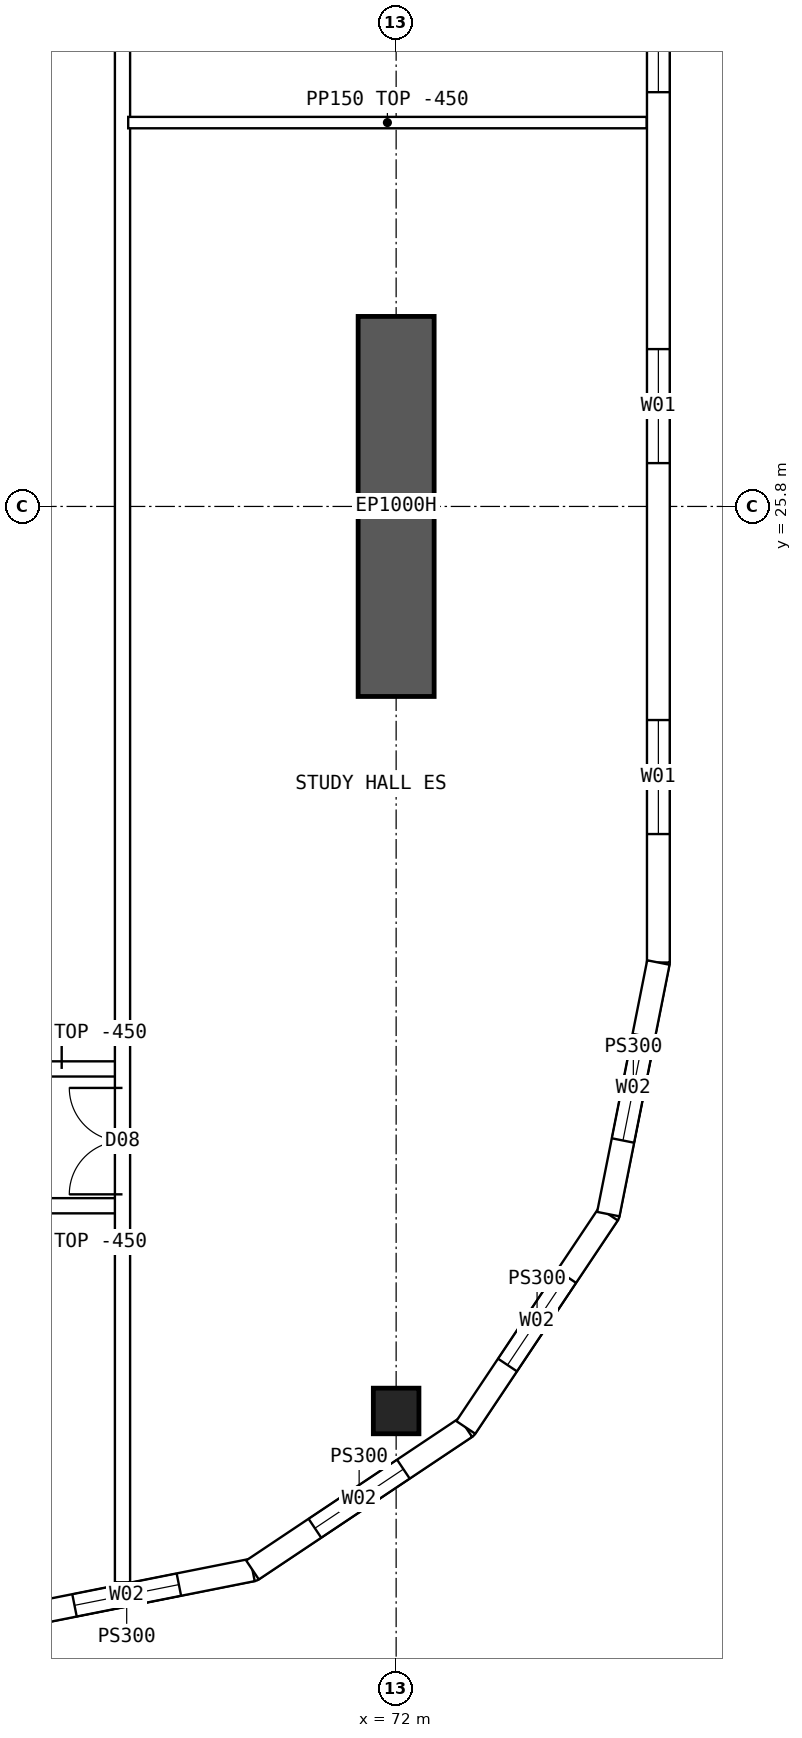
"""IFC4 building model, lengths in metres.
Left out: names, types, materials, properties, quantities, classifications, styles, units other than length and angle.
Written with IfcOpenShell. Run it as: python <this file> out.ifc"""

import sys

from ifc_helpers import new_model, si_unit, direction, frame, frame_2d, origin, origin_2d, place, context, subcontext, project, spatial, polyline, rectangle, hollow_rectangle, outline, extrude, element, fill, save


model = new_model("IFC4")
c1 = context("Model", 3, precision=1e-05, world=origin(), true_north=direction((0.0, 1.0)))
c2 = subcontext(c1, "Body", "Model", "MODEL_VIEW")
j1 = project(units=[si_unit("LENGTHUNIT", "METRE"), si_unit("PLANEANGLEUNIT", "RADIAN")], contexts=[c1])
p1 = place(None, origin())
s1 = spatial("IfcSite", under=j1, at=p1, CompositionType="ELEMENT")
p2 = place(p1, origin())
s2 = spatial("IfcBuilding", under=s1, at=p2, CompositionType="ELEMENT")
p3 = place(p2, frame((0.0, 0.0, 242.8)))
s3 = spatial("IfcBuildingStorey", under=s2, at=p3, CompositionType="ELEMENT", Elevation=242.8)
p4 = place(p3, frame((72.0, 13.9, 0.0), z_axis=(0.0, 0.0, 1.0), x_axis=(1.0, 0.0, 0.0)))
e1 = element("IfcColumn", 1, at=p4, inside=s3, PredefinedType="COLUMN", context=c2, shape_type="SweptSolid", body=[
    extrude(hollow_rectangle(XDim=0.6, YDim=0.6, WallThickness=0.06, at=origin_2d()), origin(), (0.0, 0.0, 1.0), 3.75),
])
p5 = place(p3, frame((72.0, 23.3, 0.0), z_axis=(0.0, 0.0, 1.0), x_axis=(0.0, 1.0, 0.0)))
e2 = element("IfcWall", 2, at=p5, inside=s3, PredefinedType="SHEAR", context=c2, shape_type="SweptSolid", body=[
    extrude(rectangle(XDim=5.0, YDim=1.0, at=frame_2d((2.5, 0.0))), origin(), (0.0, 0.0, 1.0), 3.75),
])
p6 = place(p3, frame((75.45, 19.8, 0.0), z_axis=(0.0, 0.0, 1.0), x_axis=(0.0, 1.0, 0.0)))
e3 = element("IfcWall", 3, at=p6, inside=s3, PredefinedType="SOLIDWALL", context=c2, shape_type="SweptSolid", body=[
    extrude(outline(polyline([(-0.015, -0.15), (24.415, -0.15), (24.385, 0.15), (0.015, 0.15), (-0.015, -0.15)])), origin(), (0.0, 0.0, 1.0), 3.3),
])
p7 = place(p6, frame((1.69, 0.0, 0.9)))
e4 = element("IfcOpeningElement", 4, at=p7, cuts=e3, PredefinedType="OPENING", context=c2, shape_type="SweptSolid", body=[
    extrude(rectangle(XDim=1.5, YDim=2.0, at=frame_2d((0.75, 1.0))), frame((0.0, 0.16, 0.0), z_axis=(0.0, -1.0, 0.0), x_axis=(1.0, 0.0, 0.0)), (0.0, 0.0, 1.0), 0.32),
])
p8 = place(p6, frame((6.57, 0.0, 0.9)))
e5 = element("IfcOpeningElement", 5, at=p8, cuts=e3, PredefinedType="OPENING", context=c2, shape_type="SweptSolid", body=[
    extrude(rectangle(XDim=1.5, YDim=2.0, at=frame_2d((0.75, 1.0))), frame((0.0, 0.16, 0.0), z_axis=(0.0, -1.0, 0.0), x_axis=(1.0, 0.0, 0.0)), (0.0, 0.0, 1.0), 0.32),
])
p9 = place(p6, frame((11.45, 0.0, 0.9)))
e6 = element("IfcOpeningElement", 6, at=p9, cuts=e3, PredefinedType="OPENING", context=c2, shape_type="SweptSolid", body=[
    extrude(rectangle(XDim=1.5, YDim=2.0, at=frame_2d((0.75, 1.0))), frame((0.0, 0.16, 0.0), z_axis=(0.0, -1.0, 0.0), x_axis=(1.0, 0.0, 0.0)), (0.0, 0.0, 1.0), 0.32),
])
p10 = place(p6, frame((16.33, 0.0, 0.9)))
e7 = element("IfcOpeningElement", 7, at=p10, cuts=e3, PredefinedType="OPENING", context=c2, shape_type="SweptSolid", body=[
    extrude(rectangle(XDim=1.5, YDim=2.0, at=frame_2d((0.75, 1.0))), frame((0.0, 0.16, 0.0), z_axis=(0.0, -1.0, 0.0), x_axis=(1.0, 0.0, 0.0)), (0.0, 0.0, 1.0), 0.32),
])
p11 = place(p6, frame((21.21, 0.0, 0.9)))
e8 = element("IfcOpeningElement", 8, at=p11, cuts=e3, PredefinedType="OPENING", context=c2, shape_type="SweptSolid", body=[
    extrude(rectangle(XDim=1.5, YDim=2.0, at=frame_2d((0.75, 1.0))), frame((0.0, 0.16, 0.0), z_axis=(0.0, -1.0, 0.0), x_axis=(1.0, 0.0, 0.0)), (0.0, 0.0, 1.0), 0.32),
])
p12 = place(p3, frame((66.8, 11.15, 0.0), z_axis=(0.0, 0.0, 1.0), x_axis=(0.98078325777, 0.195100490205, 0.0)))
e9 = element("IfcWall", 9, at=p12, inside=s3, PredefinedType="SOLIDWALL", context=c2, shape_type="SweptSolid", body=[
    extrude(outline(polyline([(-0.03, -0.15), (3.405, -0.15), (3.345, 0.15), (0.03, 0.15), (-0.03, -0.15)])), origin(), (0.0, 0.0, 1.0), 3.3),
])
p13 = place(p12, frame((0.988, 0.0, 0.9)))
e10 = element("IfcOpeningElement", 10, at=p13, cuts=e9, PredefinedType="OPENING", context=c2, shape_type="SweptSolid", body=[
    extrude(rectangle(XDim=1.4, YDim=1.8, at=frame_2d((0.7, 0.9))), frame((0.0, 0.16, 0.0), z_axis=(0.0, -1.0, 0.0), x_axis=(1.0, 0.0, 0.0)), (0.0, 0.0, 1.0), 0.32),
])
p14 = place(p3, frame((70.11, 11.808, 0.0), z_axis=(0.0, 0.0, 1.0), x_axis=(0.831460037396, 0.555584562613, 0.0)))
e11 = element("IfcWall", 11, at=p14, inside=s3, PredefinedType="SOLIDWALL", context=c2, shape_type="SweptSolid", body=[
    extrude(outline(polyline([(-0.03, -0.15), (3.405, -0.15), (3.345, 0.15), (0.03, 0.15), (-0.03, -0.15)])), origin(), (0.0, 0.0, 1.0), 3.3),
])
p15 = place(p14, frame((0.988, 0.0, 0.9)))
e12 = element("IfcOpeningElement", 12, at=p15, cuts=e11, PredefinedType="OPENING", context=c2, shape_type="SweptSolid", body=[
    extrude(rectangle(XDim=1.4, YDim=1.8, at=frame_2d((0.7, 0.9))), frame((0.0, 0.16, 0.0), z_axis=(0.0, -1.0, 0.0), x_axis=(1.0, 0.0, 0.0)), (0.0, 0.0, 1.0), 0.32),
])
p16 = place(p3, frame((72.917, 13.684, 0.0), z_axis=(0.0, 0.0, 1.0), x_axis=(0.555567969291, 0.831471124873, 0.0)))
e13 = element("IfcWall", 13, at=p16, inside=s3, PredefinedType="SOLIDWALL", context=c2, shape_type="SweptSolid", body=[
    extrude(outline(polyline([(-0.03, -0.15), (3.405, -0.15), (3.345, 0.15), (0.03, 0.15), (-0.03, -0.15)])), origin(), (0.0, 0.0, 1.0), 3.3),
])
p17 = place(p16, frame((0.988, 0.0, 0.9)))
e14 = element("IfcOpeningElement", 14, at=p17, cuts=e13, PredefinedType="OPENING", context=c2, shape_type="SweptSolid", body=[
    extrude(rectangle(XDim=1.4, YDim=1.8, at=frame_2d((0.7, 0.9))), frame((0.0, 0.16, 0.0), z_axis=(0.0, -1.0, 0.0), x_axis=(1.0, 0.0, 0.0)), (0.0, 0.0, 1.0), 0.32),
])
p18 = place(p3, frame((74.792, 16.49, 0.0), z_axis=(0.0, 0.0, 1.0), x_axis=(0.19508664885, 0.980786011034, 0.0)))
e15 = element("IfcWall", 15, at=p18, inside=s3, PredefinedType="SOLIDWALL", context=c2, shape_type="SweptSolid", body=[
    extrude(outline(polyline([(-0.03, -0.15), (3.39, -0.15), (3.36, 0.15), (0.03, 0.15), (-0.03, -0.15)])), origin(), (0.0, 0.0, 1.0), 3.3),
])
p19 = place(p18, frame((0.988, 0.0, 0.9)))
e16 = element("IfcOpeningElement", 16, at=p19, cuts=e15, PredefinedType="OPENING", context=c2, shape_type="SweptSolid", body=[
    extrude(rectangle(XDim=1.4, YDim=1.8, at=frame_2d((0.7, 0.9))), frame((0.0, 0.16, 0.0), z_axis=(0.0, -1.0, 0.0), x_axis=(1.0, 0.0, 0.0)), (0.0, 0.0, 1.0), 0.32),
])
p20 = place(p3, frame((66.35, 16.6, 0.0), z_axis=(0.0, 0.0, 1.0), x_axis=(1.0, 0.0, 0.0)))
e17 = element("IfcWall", 17, at=p20, inside=s3, PredefinedType="SOLIDWALL", context=c2, shape_type="SweptSolid", body=[
    extrude(rectangle(XDim=2.05, YDim=0.2, at=frame_2d((1.025, 0.0))), origin(), (0.0, 0.0, 1.0), 3.3),
])
p21 = place(p20, frame((0.2, 0.0, 0.0)))
e18 = element("IfcOpeningElement", 18, at=p21, cuts=e17, PredefinedType="OPENING", context=c2, shape_type="SweptSolid", body=[
    extrude(rectangle(XDim=0.9, YDim=2.1, at=frame_2d((0.45, 1.05))), frame((0.0, 0.11, 0.0), z_axis=(0.0, -1.0, 0.0), x_axis=(1.0, 0.0, 0.0)), (0.0, 0.0, 1.0), 0.22),
])
p22 = place(p3, frame((66.35, 18.4, 0.0), z_axis=(0.0, 0.0, 1.0), x_axis=(1.0, 0.0, 0.0)))
e19 = element("IfcWall", 19, at=p22, inside=s3, PredefinedType="SOLIDWALL", context=c2, shape_type="SweptSolid", body=[
    extrude(rectangle(XDim=2.05, YDim=0.2, at=frame_2d((1.025, 0.0))), origin(), (0.0, 0.0, 1.0), 3.3),
])
p23 = place(p22, frame((0.05, 0.0, 0.0)))
e20 = element("IfcOpeningElement", 20, at=p23, cuts=e19, PredefinedType="OPENING", context=c2, shape_type="SweptSolid", body=[
    extrude(rectangle(XDim=1.2, YDim=2.1, at=frame_2d((0.6, 1.05))), frame((0.0, 0.11, 0.0), z_axis=(0.0, -1.0, 0.0), x_axis=(1.0, 0.0, 0.0)), (0.0, 0.0, 1.0), 0.22),
])
p24 = place(p3, frame((68.475, 30.85, 0.0), z_axis=(0.0, 0.0, 1.0), x_axis=(1.0, 0.0, 0.0)))
e21 = element("IfcWall", 21, at=p24, inside=s3, PredefinedType="PARTITIONING", context=c2, shape_type="SweptSolid", body=[
    extrude(outline(polyline([(0.0, 0.0), (6.82, 0.0), (6.82, 3.3), (3.827, 3.3), (3.825, 2.85), (3.227, 2.85), (3.225, 3.3), (0.0, 3.3), (0.0, 0.0)])), frame((0.0, 0.075, 0.0), z_axis=(0.0, -1.0, 0.0), x_axis=(1.0, 0.0, 0.0)), (0.0, 0.0, 1.0), 0.15),
])
p25 = place(p3, frame((68.4, 11.646, 0.0), z_axis=(0.0, 0.0, 1.0), x_axis=(0.0, 1.0, 0.0)))
e22 = element("IfcWall", 22, at=p25, inside=s3, PredefinedType="SOLIDWALL", context=c2, shape_type="SweptSolid", body=[
    extrude(rectangle(XDim=40.708, YDim=0.2, at=frame_2d((20.354, 0.0))), origin(), (0.0, 0.0, 1.0), 3.3),
])
p26 = place(p25, frame((5.104, 0.0, 0.0)))
e23 = element("IfcOpeningElement", 23, at=p26, cuts=e22, PredefinedType="OPENING", context=c2, shape_type="SweptSolid", body=[
    extrude(rectangle(XDim=1.4, YDim=2.1, at=frame_2d((0.7, 1.05))), frame((0.0, 0.11, 0.0), z_axis=(0.0, -1.0, 0.0), x_axis=(1.0, 0.0, 0.0)), (0.0, 0.0, 1.0), 0.22),
])
p27 = place(p25, frame((34.104, 0.0, 0.0)))
e24 = element("IfcOpeningElement", 24, at=p27, cuts=e22, PredefinedType="OPENING", context=c2, shape_type="SweptSolid", body=[
    extrude(rectangle(XDim=1.4, YDim=2.1, at=frame_2d((0.7, 1.05))), frame((0.0, 0.11, 0.0), z_axis=(0.0, -1.0, 0.0), x_axis=(1.0, 0.0, 0.0)), (0.0, 0.0, 1.0), 0.22),
])
p28 = place(p7, origin())
e25 = element("IfcWindow", 25, at=p28, inside=s3, PartitioningType="SINGLE_PANEL", PredefinedType="WINDOW", context=c2, shape_type="SweptSolid", body=[
    extrude(rectangle(XDim=1.5, YDim=2.0, at=frame_2d((0.75, 1.0))), frame((0.0, 0.03, 0.0), z_axis=(0.0, -1.0, 0.0), x_axis=(1.0, 0.0, 0.0)), (0.0, 0.0, 1.0), 0.06),
])
fill(e4, e25)
p29 = place(p8, origin())
e26 = element("IfcWindow", 26, at=p29, inside=s3, PartitioningType="SINGLE_PANEL", PredefinedType="WINDOW", context=c2, shape_type="SweptSolid", body=[
    extrude(rectangle(XDim=1.5, YDim=2.0, at=frame_2d((0.75, 1.0))), frame((0.0, 0.03, 0.0), z_axis=(0.0, -1.0, 0.0), x_axis=(1.0, 0.0, 0.0)), (0.0, 0.0, 1.0), 0.06),
])
fill(e5, e26)
p30 = place(p9, origin())
e27 = element("IfcWindow", 27, at=p30, inside=s3, PartitioningType="SINGLE_PANEL", PredefinedType="WINDOW", context=c2, shape_type="SweptSolid", body=[
    extrude(rectangle(XDim=1.5, YDim=2.0, at=frame_2d((0.75, 1.0))), frame((0.0, 0.03, 0.0), z_axis=(0.0, -1.0, 0.0), x_axis=(1.0, 0.0, 0.0)), (0.0, 0.0, 1.0), 0.06),
])
fill(e6, e27)
p31 = place(p13, origin())
e28 = element("IfcWindow", 28, at=p31, inside=s3, PartitioningType="SINGLE_PANEL", PredefinedType="WINDOW", context=c2, shape_type="SweptSolid", body=[
    extrude(rectangle(XDim=1.4, YDim=1.8, at=frame_2d((0.7, 0.9))), frame((0.0, 0.03, 0.0), z_axis=(0.0, -1.0, 0.0), x_axis=(1.0, 0.0, 0.0)), (0.0, 0.0, 1.0), 0.06),
])
fill(e10, e28)
p32 = place(p15, origin())
e29 = element("IfcWindow", 29, at=p32, inside=s3, PartitioningType="SINGLE_PANEL", PredefinedType="WINDOW", context=c2, shape_type="SweptSolid", body=[
    extrude(rectangle(XDim=1.4, YDim=1.8, at=frame_2d((0.7, 0.9))), frame((0.0, 0.03, 0.0), z_axis=(0.0, -1.0, 0.0), x_axis=(1.0, 0.0, 0.0)), (0.0, 0.0, 1.0), 0.06),
])
fill(e12, e29)
p33 = place(p17, origin())
e30 = element("IfcWindow", 30, at=p33, inside=s3, PartitioningType="SINGLE_PANEL", PredefinedType="WINDOW", context=c2, shape_type="SweptSolid", body=[
    extrude(rectangle(XDim=1.4, YDim=1.8, at=frame_2d((0.7, 0.9))), frame((0.0, 0.03, 0.0), z_axis=(0.0, -1.0, 0.0), x_axis=(1.0, 0.0, 0.0)), (0.0, 0.0, 1.0), 0.06),
])
fill(e14, e30)
p34 = place(p19, origin())
e31 = element("IfcWindow", 31, at=p34, inside=s3, PartitioningType="SINGLE_PANEL", PredefinedType="WINDOW", context=c2, shape_type="SweptSolid", body=[
    extrude(rectangle(XDim=1.4, YDim=1.8, at=frame_2d((0.7, 0.9))), frame((0.0, 0.03, 0.0), z_axis=(0.0, -1.0, 0.0), x_axis=(1.0, 0.0, 0.0)), (0.0, 0.0, 1.0), 0.06),
])
fill(e16, e31)
p35 = place(p23, origin())
e32 = element("IfcDoor", 32, at=p35, inside=s3, OperationType="DOUBLE_DOOR_SINGLE_SWING", PredefinedType="DOOR", context=c2, shape_type="SweptSolid", body=[
    extrude(rectangle(XDim=1.2, YDim=2.1, at=frame_2d((0.6, 1.05))), frame((0.0, 0.025, 0.0), z_axis=(0.0, -1.0, 0.0), x_axis=(1.0, 0.0, 0.0)), (0.0, 0.0, 1.0), 0.05),
])
fill(e20, e32)
p36 = place(p26, origin())
e33 = element("IfcDoor", 33, at=p36, inside=s3, OperationType="DOUBLE_DOOR_SINGLE_SWING", PredefinedType="DOOR", context=c2, shape_type="SweptSolid", body=[
    extrude(rectangle(XDim=1.4, YDim=2.1, at=frame_2d((0.7, 1.05))), frame((0.0, 0.025, 0.0), z_axis=(0.0, -1.0, 0.0), x_axis=(1.0, 0.0, 0.0)), (0.0, 0.0, 1.0), 0.05),
])
fill(e23, e33)
save(model, sys.argv[1])
